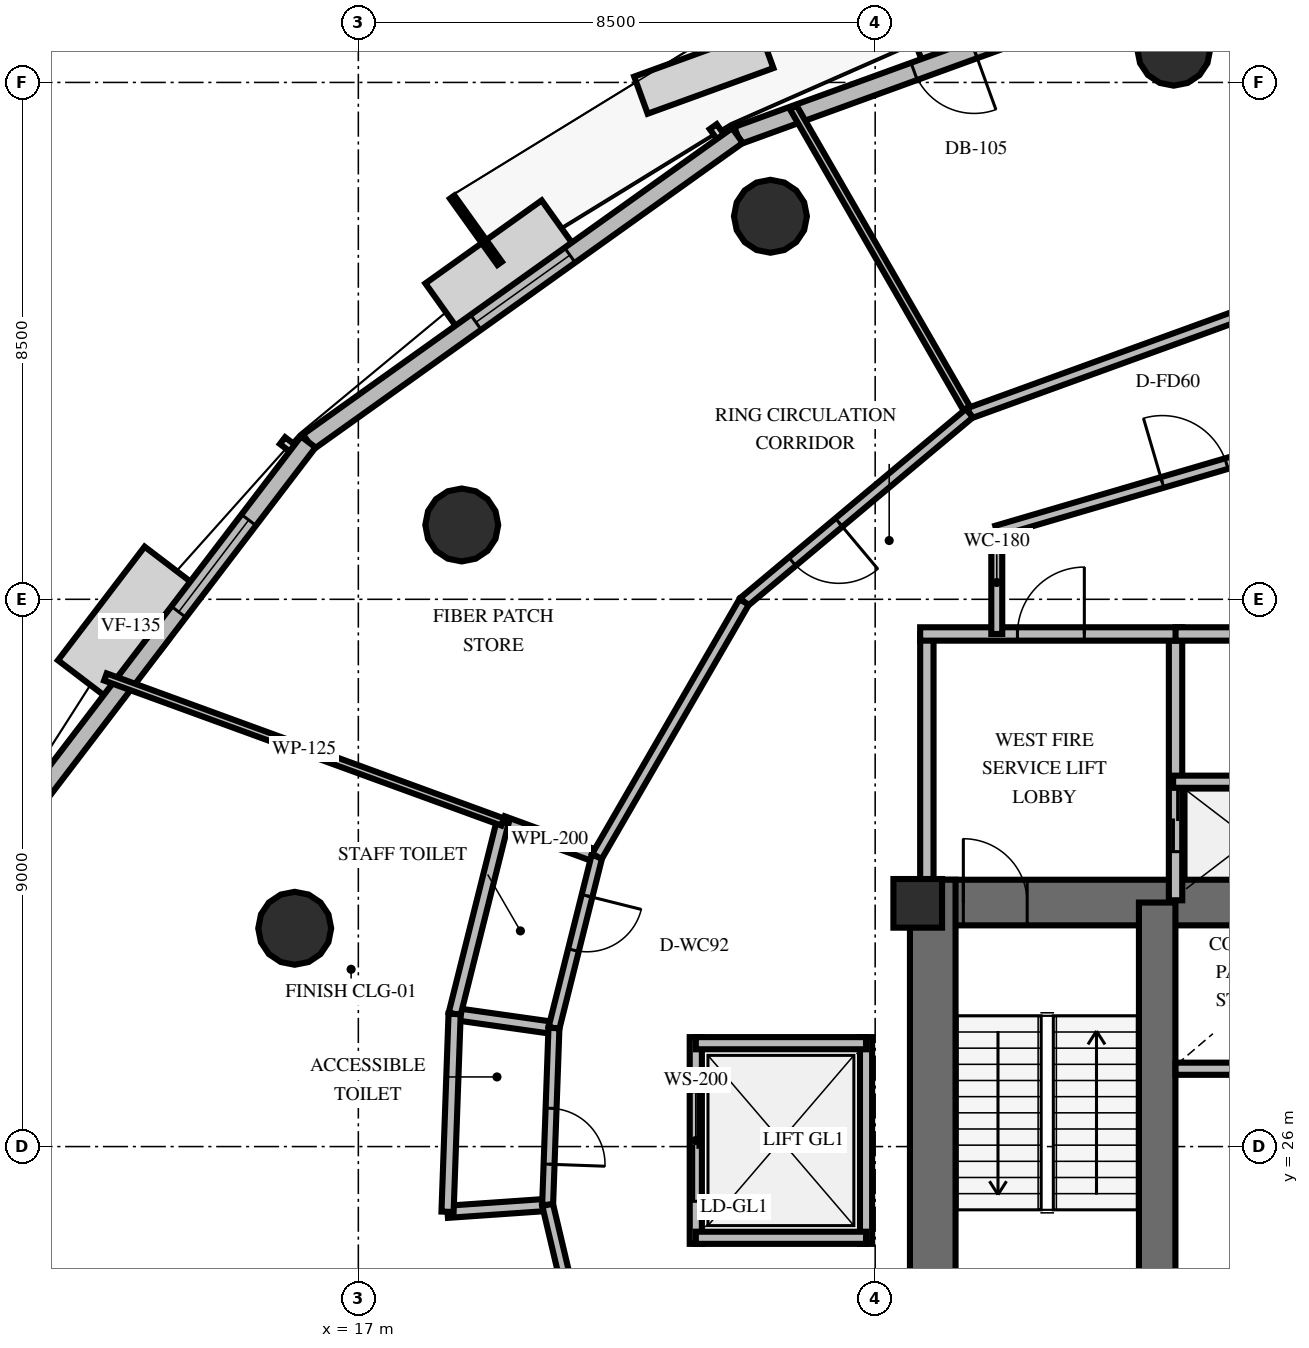
"""IFC4 building model, lengths in metres.
Left out: names, types, materials, properties, quantities, classifications, styles, units other than length and angle.
Written with IfcOpenShell. Run it as: python <this file> out.ifc"""

import sys

from ifc_helpers import new_model, si_unit, direction, frame, frame_2d, origin, origin_2d, place, context, subcontext, project, spatial, rectangle, circle, extrude, element, fill, save


model = new_model("IFC4")
c1 = context("Model", 3, precision=1e-05, world=origin(), true_north=direction((0.0, 1.0)))
c2 = subcontext(c1, "Body", "Model", "MODEL_VIEW")
j1 = project(units=[si_unit("LENGTHUNIT", "METRE"), si_unit("PLANEANGLEUNIT", "RADIAN")], contexts=[c1])
p1 = place(None, origin())
s1 = spatial("IfcSite", under=j1, at=p1, CompositionType="ELEMENT")
p2 = place(p1, origin())
s2 = spatial("IfcBuilding", under=s1, at=p2, CompositionType="ELEMENT")
p3 = place(p2, frame((0.0, 0.0, 117.8)))
s3 = spatial("IfcBuildingStorey", under=s2, at=p3, CompositionType="ELEMENT", Elevation=117.8)
p4 = place(p3, frame((26.072, 30.013, 0.0), z_axis=(0.0, 0.0, 1.0), x_axis=(1.0, 0.0, 0.0)))
e1 = element("IfcWall", 1, at=p4, inside=s3, PredefinedType="SHEAR", context=c2, shape_type="SweptSolid", body=[
    extrude(rectangle(XDim=15.866, YDim=0.75, at=frame_2d((7.933, 0.0))), origin(), (0.0, 0.0, 1.0), 4.0),
])
p5 = place(p4, frame((0.878, 0.0, 0.0)))
e2 = element("IfcOpeningElement", 2, at=p5, cuts=e1, PredefinedType="OPENING", context=c2, shape_type="SweptSolid", body=[
    extrude(rectangle(XDim=1.05, YDim=2.15, at=frame_2d((0.525, 1.075))), frame((0.0, 0.385, 0.0), z_axis=(0.0, -1.0, 0.0), x_axis=(1.0, 0.0, 0.0)), (0.0, 0.0, 1.0), 0.77),
])
p6 = place(p4, frame((13.928, 0.0, 0.0)))
e3 = element("IfcOpeningElement", 3, at=p6, cuts=e1, PredefinedType="OPENING", context=c2, shape_type="SweptSolid", body=[
    extrude(rectangle(XDim=1.05, YDim=2.15, at=frame_2d((0.525, 1.075))), frame((0.0, 0.385, 0.0), z_axis=(0.0, -1.0, 0.0), x_axis=(1.0, 0.0, 0.0)), (0.0, 0.0, 1.0), 0.77),
])
p7 = place(p4, frame((7.378, 0.0, 0.0)))
e4 = element("IfcOpeningElement", 4, at=p7, cuts=e1, PredefinedType="OPENING", context=c2, shape_type="SweptSolid", body=[
    extrude(rectangle(XDim=1.1, YDim=2.15, at=frame_2d((0.55, 1.075))), frame((0.0, 0.385, 0.0), z_axis=(0.0, -1.0, 0.0), x_axis=(1.0, 0.0, 0.0)), (0.0, 0.0, 1.0), 0.77),
])
p8 = place(p3, frame((26.447, 19.812, 0.0), z_axis=(0.0, 0.0, 1.0), x_axis=(0.0, 1.0, 0.0)))
e5 = element("IfcWall", 5, at=p8, inside=s3, PredefinedType="SHEAR", context=c2, shape_type="SweptSolid", body=[
    extrude(rectangle(XDim=10.576, YDim=0.75, at=frame_2d((5.288, 0.0))), origin(), (0.0, 0.0, 1.0), 4.0),
])
p9 = place(p3, frame((30.138, 20.187, 0.0), z_axis=(0.0, 0.0, 1.0), x_axis=(0.0, 1.0, 0.0)))
e6 = element("IfcWall", 6, at=p9, inside=s3, PredefinedType="SHEAR", context=c2, shape_type="SweptSolid", body=[
    extrude(rectangle(XDim=9.826, YDim=0.6, at=frame_2d((4.913, 0.0))), origin(), (0.0, 0.0, 1.0), 4.0),
])
p10 = place(p3, frame((26.2, 30.0, 0.0), z_axis=(0.0, 0.0, 1.0), x_axis=(1.0, 0.0, 0.0)))
e7 = element("IfcColumn", 7, at=p10, inside=s3, PredefinedType="PILASTER", context=c2, shape_type="SweptSolid", body=[
    extrude(rectangle(XDim=0.8, YDim=0.8, at=origin_2d()), origin(), (0.0, 0.0, 1.0), 4.0),
])
for number, where, z_axis, x_axis in (
    (8, (30.41, 44.046, 0.0), (0.0, 0.0, 1.0), (1.0, 0.0, 0.0)),
    (9, (23.778, 41.299, 0.0), (0.0, 0.0, 1.0), (1.0, 0.0, 0.0)),
    (10, (18.701, 36.222, 0.0), (0.0, 0.0, 1.0), (1.0, 0.0, 0.0)),
    (11, (15.954, 29.59, 0.0), (0.0, 0.0, 1.0), (1.0, 0.0, 0.0)),
):
    element("IfcColumn", number, at=place(p3, frame(where, z_axis=z_axis, x_axis=x_axis)), inside=s3, PredefinedType="COLUMN", context=c2, shape_type="SweptSolid", body=[
        extrude(circle(Radius=0.6, at=origin_2d()), origin(), (0.0, 0.0, 1.0), 4.0),
    ])
p11 = place(p3, frame((31.593, 45.661, 0.0), z_axis=(0.0, 0.0, 1.0), x_axis=(-0.939992901383, -0.341193999582, 0.0)))
e12 = element("IfcWall", 12, at=p11, inside=s3, PredefinedType="SOLIDWALL", context=c2, shape_type="SweptSolid", body=[
    extrude(rectangle(XDim=8.891, YDim=0.3, at=frame_2d((4.445, 0.0))), origin(), (0.0, 0.0, 1.0), 2.9),
])
p12 = place(p11, frame((4.75, 0.0, 0.0)))
e13 = element("IfcOpeningElement", 13, at=p12, cuts=e12, PredefinedType="OPENING", context=c2, shape_type="SweptSolid", body=[
    extrude(rectangle(XDim=1.05, YDim=2.15, at=frame_2d((0.525, 1.075))), frame((0.0, 0.16, 0.0), z_axis=(0.0, -1.0, 0.0), x_axis=(1.0, 0.0, 0.0)), (0.0, 0.0, 1.0), 0.32),
])
p13 = place(p3, frame((23.236, 42.627, 0.0), z_axis=(0.0, 0.0, 1.0), x_axis=(-0.8139046132, -0.580998520317, 0.0)))
e14 = element("IfcWall", 14, at=p13, inside=s3, PredefinedType="SOLIDWALL", context=c2, shape_type="SweptSolid", body=[
    extrude(rectangle(XDim=8.673, YDim=0.3, at=frame_2d((4.336, 0.0))), origin(), (0.0, 0.0, 1.0), 2.9),
])
p14 = place(p13, frame((3.386, 0.0, 0.8)))
e15 = element("IfcOpeningElement", 15, at=p14, cuts=e14, PredefinedType="OPENING", context=c2, shape_type="SweptSolid", body=[
    extrude(rectangle(XDim=1.9, YDim=1.95, at=frame_2d((0.95, 0.975))), frame((0.0, 0.16, 0.0), z_axis=(0.0, -1.0, 0.0), x_axis=(1.0, 0.0, 0.0)), (0.0, 0.0, 1.0), 0.32),
])
p15 = place(p3, frame((16.177, 37.588, 0.0), z_axis=(0.0, 0.0, 1.0), x_axis=(-0.606432047851, -0.795135316371, 0.0)))
e16 = element("IfcWall", 16, at=p15, inside=s3, PredefinedType="SOLIDWALL", context=c2, shape_type="SweptSolid", body=[
    extrude(rectangle(XDim=8.095, YDim=0.3, at=frame_2d((4.048, 0.0))), origin(), (0.0, 0.0, 1.0), 2.9),
])
p16 = place(p15, frame((1.615, 0.0, 0.8)))
e17 = element("IfcOpeningElement", 17, at=p16, cuts=e16, PredefinedType="OPENING", context=c2, shape_type="SweptSolid", body=[
    extrude(rectangle(XDim=1.9, YDim=1.95, at=frame_2d((0.95, 0.975))), frame((0.0, 0.16, 0.0), z_axis=(0.0, -1.0, 0.0), x_axis=(1.0, 0.0, 0.0)), (0.0, 0.0, 1.0), 0.32),
])
p17 = place(p3, frame((26.35, 30.05, 0.0), z_axis=(0.0, 0.0, 1.0), x_axis=(0.0, 1.0, 0.0)))
e18 = element("IfcWall", 18, at=p17, inside=s3, PredefinedType="SOLIDWALL", context=c2, shape_type="SweptSolid", body=[
    extrude(rectangle(XDim=4.38, YDim=0.22, at=frame_2d((2.19, 0.0))), origin(), (0.0, 0.0, 1.0), 2.8),
])
p18 = place(p3, frame((30.44, 30.05, 0.0), z_axis=(0.0, 0.0, 1.0), x_axis=(0.0, 1.0, 0.0)))
e19 = element("IfcWall", 19, at=p18, inside=s3, PredefinedType="SOLIDWALL", context=c2, shape_type="SweptSolid", body=[
    extrude(rectangle(XDim=4.38, YDim=0.22, at=frame_2d((2.19, 0.0))), origin(), (0.0, 0.0, 1.0), 2.8),
])
p19 = place(p18, frame((0.8, 0.0, 0.0)))
e20 = element("IfcOpeningElement", 20, at=p19, cuts=e19, PredefinedType="OPENING", context=c2, shape_type="SweptSolid", body=[
    extrude(rectangle(XDim=1.05, YDim=2.1, at=frame_2d((0.525, 1.05))), frame((0.0, 0.12, 0.0), z_axis=(0.0, -1.0, 0.0), x_axis=(1.0, 0.0, 0.0)), (0.0, 0.0, 1.0), 0.24),
])
p20 = place(p3, frame((26.24, 34.43, 0.0), z_axis=(0.0, 0.0, 1.0), x_axis=(1.0, 0.0, 0.0)))
e21 = element("IfcWall", 21, at=p20, inside=s3, PredefinedType="SOLIDWALL", context=c2, shape_type="SweptSolid", body=[
    extrude(rectangle(XDim=4.31, YDim=0.22, at=frame_2d((2.155, 0.0))), origin(), (0.0, 0.0, 1.0), 2.8),
])
p21 = place(p20, frame((1.6, 0.0, 0.0)))
e22 = element("IfcOpeningElement", 22, at=p21, cuts=e21, PredefinedType="OPENING", context=c2, shape_type="SweptSolid", body=[
    extrude(rectangle(XDim=1.1, YDim=2.15, at=frame_2d((0.55, 1.075))), frame((0.0, 0.12, 0.0), z_axis=(0.0, -1.0, 0.0), x_axis=(1.0, 0.0, 0.0)), (0.0, 0.0, 1.0), 0.24),
])
p22 = place(p3, frame((30.4, 32.0, 0.0), z_axis=(0.0, 0.0, 1.0), x_axis=(1.0, 0.0, 0.0)))
e23 = element("IfcWall", 23, at=p22, inside=s3, PredefinedType="SOLIDWALL", context=c2, shape_type="SweptSolid", body=[
    extrude(rectangle(XDim=2.55, YDim=0.2, at=frame_2d((1.275, 0.0))), origin(), (0.0, 0.0, 1.0), 2.8),
])
p23 = place(p3, frame((30.44, 34.43, 0.0), z_axis=(0.0, 0.0, 1.0), x_axis=(1.0, 0.0, 0.0)))
e24 = element("IfcWall", 24, at=p23, inside=s3, PredefinedType="SOLIDWALL", context=c2, shape_type="SweptSolid", body=[
    extrude(rectangle(XDim=7.12, YDim=0.22, at=frame_2d((3.56, 0.0))), origin(), (0.0, 0.0, 1.0), 2.8),
])
p24 = place(p23, frame((3.01, 0.0, 0.0)))
e25 = element("IfcOpeningElement", 25, at=p24, cuts=e24, PredefinedType="OPENING", context=c2, shape_type="SweptSolid", body=[
    extrude(rectangle(XDim=1.1, YDim=2.15, at=frame_2d((0.55, 1.075))), frame((0.0, 0.12, 0.0), z_axis=(0.0, -1.0, 0.0), x_axis=(1.0, 0.0, 0.0)), (0.0, 0.0, 1.0), 0.24),
])
p25 = place(p3, frame((30.44, 27.28, 0.0), z_axis=(0.0, 0.0, 1.0), x_axis=(1.0, 0.0, 0.0)))
e26 = element("IfcWall", 26, at=p25, inside=s3, PredefinedType="SOLIDWALL", context=c2, shape_type="SweptSolid", body=[
    extrude(rectangle(XDim=2.81, YDim=0.2, at=frame_2d((1.405, 0.0))), origin(), (0.0, 0.0, 1.0), 2.8),
])
p26 = place(p3, frame((22.55, 24.4, 0.0), z_axis=(0.0, 0.0, 1.0), x_axis=(0.0, 1.0, 0.0)))
e27 = element("IfcWall", 27, at=p26, inside=s3, PredefinedType="SOLIDWALL", context=c2, shape_type="SweptSolid", body=[
    extrude(rectangle(XDim=3.4, YDim=0.2, at=frame_2d((1.7, 0.0))), origin(), (0.0, 0.0, 1.0), 2.8),
])
p27 = place(p26, frame((0.7, 0.0, 0.0)))
e28 = element("IfcOpeningElement", 28, at=p27, cuts=e27, PredefinedType="OPENING", context=c2, shape_type="SweptSolid", body=[
    extrude(rectangle(XDim=1.8, YDim=2.4, at=frame_2d((0.9, 1.2))), frame((0.0, 0.11, 0.0), z_axis=(0.0, -1.0, 0.0), x_axis=(1.0, 0.0, 0.0)), (0.0, 0.0, 1.0), 0.22),
])
p28 = place(p3, frame((25.35, 24.4, 0.0), z_axis=(0.0, 0.0, 1.0), x_axis=(0.0, 1.0, 0.0)))
e29 = element("IfcWall", 29, at=p28, inside=s3, PredefinedType="SOLIDWALL", context=c2, shape_type="SweptSolid", body=[
    extrude(rectangle(XDim=3.4, YDim=0.2, at=frame_2d((1.7, 0.0))), origin(), (0.0, 0.0, 1.0), 2.8),
])
for number, where, z_axis, x_axis in (
    (30, (22.55, 24.5, 0.0), (0.0, 0.0, 1.0), (1.0, 0.0, 0.0)),
    (31, (22.55, 27.7, 0.0), (0.0, 0.0, 1.0), (1.0, 0.0, 0.0)),
):
    element("IfcWall", number, at=place(p3, frame(where, z_axis=z_axis, x_axis=x_axis)), inside=s3, PredefinedType="SOLIDWALL", context=c2, shape_type="SweptSolid", body=[
        extrude(rectangle(XDim=2.8, YDim=0.2, at=frame_2d((1.4, 0.0))), origin(), (0.0, 0.0, 1.0), 2.8),
    ])
p29 = place(p3, frame((27.5, 34.43, 0.0), z_axis=(0.0, 0.0, 1.0), x_axis=(0.0, 1.0, 0.0)))
e32 = element("IfcWall", 32, at=p29, inside=s3, PredefinedType="PARTITIONING", context=c2, shape_type="SweptSolid", body=[
    extrude(rectangle(XDim=1.693, YDim=0.18, at=frame_2d((0.846, 0.0))), origin(), (0.0, 0.0, 1.0), 2.8),
])
p30 = place(p3, frame((27.5, 36.123, 0.0), z_axis=(0.0, 0.0, 1.0), x_axis=(0.959546654541, 0.281549671923, 0.0)))
e33 = element("IfcWall", 33, at=p30, inside=s3, PredefinedType="PARTITIONING", context=c2, shape_type="SweptSolid", body=[
    extrude(rectangle(XDim=6.774, YDim=0.18, at=frame_2d((3.387, 0.0))), origin(), (0.0, 0.0, 1.0), 2.8),
])
p31 = place(p30, frame((2.837, 0.0, 0.0)))
e34 = element("IfcOpeningElement", 34, at=p31, cuts=e33, PredefinedType="OPENING", context=c2, shape_type="SweptSolid", body=[
    extrude(rectangle(XDim=1.1, YDim=2.15, at=frame_2d((0.55, 1.075))), frame((0.0, 0.1, 0.0), z_axis=(0.0, -1.0, 0.0), x_axis=(1.0, 0.0, 0.0)), (0.0, 0.0, 1.0), 0.2),
])
for number, where, z_axis, x_axis in (
    (35, (20.924, 30.772, 0.0), (0.0, 0.0, 1.0), (-0.939, 0.343, 0.0)),
    (36, (20.217, 27.949, 0.0), (0.0, 0.0, 1.0), (-0.99, 0.14, 0.0)),
):
    element("IfcWall", number, at=place(p3, frame(where, z_axis=z_axis, x_axis=x_axis)), inside=s3, PredefinedType="PLUMBINGWALL", context=c2, shape_type="SweptSolid", body=[
        extrude(rectangle(XDim=1.65, YDim=0.2, at=frame_2d((0.825, 0.0))), origin(), (0.0, 0.0, 1.0), 2.8),
    ])
p32 = place(p3, frame((19.374, 31.338, 0.0), z_axis=(0.0, 0.0, 1.0), x_axis=(-0.242729761631, -0.970093945357, 0.0)))
e37 = element("IfcWall", 37, at=p32, inside=s3, PredefinedType="PLUMBINGWALL", context=c2, shape_type="SweptSolid", body=[
    extrude(rectangle(XDim=3.255, YDim=0.2, at=frame_2d((1.627, 0.0))), origin(), (0.0, 0.0, 1.0), 2.8),
])
p33 = place(p3, frame((20.924, 30.772, 0.0), z_axis=(0.0, 0.0, 1.0), x_axis=(-0.242713284666, -0.970098067953, 0.0)))
e38 = element("IfcWall", 38, at=p33, inside=s3, PredefinedType="PARTITIONING", context=c2, shape_type="SweptSolid", body=[
    extrude(rectangle(XDim=2.91, YDim=0.18, at=frame_2d((1.455, 0.0))), origin(), (0.0, 0.0, 1.0), 2.8),
])
p34 = place(p33, frame((0.669, 0.0, 0.0)))
e39 = element("IfcOpeningElement", 39, at=p34, cuts=e38, PredefinedType="OPENING", context=c2, shape_type="SweptSolid", body=[
    extrude(rectangle(XDim=0.92, YDim=2.1, at=frame_2d((0.46, 1.05))), frame((0.0, 0.1, 0.0), z_axis=(0.0, -1.0, 0.0), x_axis=(1.0, 0.0, 0.0)), (0.0, 0.0, 1.0), 0.2),
])
p35 = place(p3, frame((20.113, 25.041, 0.0), z_axis=(0.0, 0.0, 1.0), x_axis=(-0.99762997818, -0.068807169958, 0.0)))
e40 = element("IfcWall", 40, at=p35, inside=s3, PredefinedType="PLUMBINGWALL", context=c2, shape_type="SweptSolid", body=[
    extrude(rectangle(XDim=1.65, YDim=0.2, at=frame_2d((0.825, 0.0))), origin(), (0.0, 0.0, 1.0), 2.8),
])
p36 = place(p3, frame((18.583, 28.18, 0.0), z_axis=(0.0, 0.0, 1.0), x_axis=(-0.035777140599, -0.999359793173, 0.0)))
e41 = element("IfcWall", 41, at=p36, inside=s3, PredefinedType="PLUMBINGWALL", context=c2, shape_type="SweptSolid", body=[
    extrude(rectangle(XDim=3.255, YDim=0.2, at=frame_2d((1.627, 0.0))), origin(), (0.0, 0.0, 1.0), 2.8),
])
p37 = place(p3, frame((20.217, 27.949, 0.0), z_axis=(0.0, 0.0, 1.0), x_axis=(-0.035823197379, -0.999358143275, 0.0)))
e42 = element("IfcWall", 42, at=p37, inside=s3, PredefinedType="PARTITIONING", context=c2, shape_type="SweptSolid", body=[
    extrude(rectangle(XDim=2.91, YDim=0.18, at=frame_2d((1.455, 0.0))), origin(), (0.0, 0.0, 1.0), 2.8),
])
p38 = place(p37, frame((1.321, 0.0, 0.0)))
e43 = element("IfcOpeningElement", 43, at=p38, cuts=e42, PredefinedType="OPENING", context=c2, shape_type="SweptSolid", body=[
    extrude(rectangle(XDim=0.92, YDim=2.1, at=frame_2d((0.46, 1.05))), frame((0.0, 0.1, 0.0), z_axis=(0.0, -1.0, 0.0), x_axis=(1.0, 0.0, 0.0)), (0.0, 0.0, 1.0), 0.2),
])
p39 = place(p3, frame((19.374, 31.338, 0.0), z_axis=(0.0, 0.0, 1.0), x_axis=(-0.939385857188, 0.342861796232, 0.0)))
e44 = element("IfcWall", 44, at=p39, inside=s3, PredefinedType="PARTITIONING", context=c2, shape_type="SweptSolid", body=[
    extrude(rectangle(XDim=6.955, YDim=0.125, at=frame_2d((3.478, 0.0))), origin(), (0.0, 0.0, 1.0), 2.8),
])
p40 = place(p3, frame((20.113, 25.041, 0.0), z_axis=(0.0, 0.0, 1.0), x_axis=(0.229765650993, -0.973245984129, 0.0)))
e45 = element("IfcWall", 45, at=p40, inside=s3, PredefinedType="PARTITIONING", context=c2, shape_type="SweptSolid", body=[
    extrude(rectangle(XDim=4.515, YDim=0.18, at=frame_2d((2.257, 0.0))), origin(), (0.0, 0.0, 1.0), 2.8),
])
p41 = place(p3, frame((27.051, 38.061, 0.0), z_axis=(0.0, 0.0, 1.0), x_axis=(-0.499221008812, 0.866474687663, 0.0)))
e46 = element("IfcWall", 46, at=p41, inside=s3, PredefinedType="PARTITIONING", context=c2, shape_type="SweptSolid", body=[
    extrude(rectangle(XDim=5.803, YDim=0.125, at=frame_2d((2.902, 0.0))), origin(), (0.0, 0.0, 1.0), 2.8),
])
p42 = place(p3, frame((31.595, 39.711, 0.0), z_axis=(0.0, 0.0, 1.0), x_axis=(-0.939977597515, -0.341236158943, 0.0)))
e47 = element("IfcWall", 47, at=p42, inside=s3, PredefinedType="PARTITIONING", context=c2, shape_type="SweptSolid", body=[
    extrude(rectangle(XDim=4.834, YDim=0.18, at=frame_2d((2.417, 0.0))), origin(), (0.0, 0.0, 1.0), 2.8),
])
p43 = place(p3, frame((27.051, 38.061, 0.0), z_axis=(0.0, 0.0, 1.0), x_axis=(-0.766604462261, -0.642119613811, 0.0)))
e48 = element("IfcWall", 48, at=p43, inside=s3, PredefinedType="PARTITIONING", context=c2, shape_type="SweptSolid", body=[
    extrude(rectangle(XDim=4.834, YDim=0.18, at=frame_2d((2.417, 0.0))), origin(), (0.0, 0.0, 1.0), 2.8),
])
p44 = place(p43, frame((2.801, 0.0, 0.0)))
e49 = element("IfcOpeningElement", 49, at=p44, cuts=e48, PredefinedType="OPENING", context=c2, shape_type="SweptSolid", body=[
    extrude(rectangle(XDim=1.0, YDim=2.15, at=frame_2d((0.5, 1.075))), frame((0.0, 0.1, 0.0), z_axis=(0.0, -1.0, 0.0), x_axis=(1.0, 0.0, 0.0)), (0.0, 0.0, 1.0), 0.2),
])
p45 = place(p3, frame((23.344, 34.957, 0.0), z_axis=(0.0, 0.0, 1.0), x_axis=(-0.500765511673, -0.865582984074, 0.0)))
e50 = element("IfcWall", 50, at=p45, inside=s3, PredefinedType="PARTITIONING", context=c2, shape_type="SweptSolid", body=[
    extrude(rectangle(XDim=4.834, YDim=0.18, at=frame_2d((2.417, 0.0))), origin(), (0.0, 0.0, 1.0), 2.8),
])
p46 = place(p12, origin())
e51 = element("IfcDoor", 51, at=p46, inside=s3, OperationType="SINGLE_SWING_LEFT", PredefinedType="DOOR", context=c2, shape_type="SweptSolid", body=[
    extrude(rectangle(XDim=1.05, YDim=2.15, at=frame_2d((0.525, 1.075))), frame((0.0, 0.025, 0.0), z_axis=(0.0, -1.0, 0.0), x_axis=(1.0, 0.0, 0.0)), (0.0, 0.0, 1.0), 0.05),
])
fill(e13, e51)
p47 = place(p14, origin())
e52 = element("IfcWindow", 52, at=p47, inside=s3, PartitioningType="SINGLE_PANEL", PredefinedType="WINDOW", context=c2, shape_type="SweptSolid", body=[
    extrude(rectangle(XDim=1.9, YDim=1.95, at=frame_2d((0.95, 0.975))), frame((0.0, 0.03, 0.0), z_axis=(0.0, -1.0, 0.0), x_axis=(1.0, 0.0, 0.0)), (0.0, 0.0, 1.0), 0.06),
])
fill(e15, e52)
p48 = place(p16, origin())
e53 = element("IfcWindow", 53, at=p48, inside=s3, PartitioningType="SINGLE_PANEL", PredefinedType="WINDOW", context=c2, shape_type="SweptSolid", body=[
    extrude(rectangle(XDim=1.9, YDim=1.95, at=frame_2d((0.95, 0.975))), frame((0.0, 0.03, 0.0), z_axis=(0.0, -1.0, 0.0), x_axis=(1.0, 0.0, 0.0)), (0.0, 0.0, 1.0), 0.06),
])
fill(e17, e53)
p49 = place(p5, origin())
e54 = element("IfcDoor", 54, at=p49, inside=s3, OperationType="SINGLE_SWING_LEFT", PredefinedType="DOOR", context=c2, shape_type="SweptSolid", body=[
    extrude(rectangle(XDim=1.05, YDim=2.15, at=frame_2d((0.525, 1.075))), frame((0.0, 0.025, 0.0), z_axis=(0.0, -1.0, 0.0), x_axis=(1.0, 0.0, 0.0)), (0.0, 0.0, 1.0), 0.05),
])
fill(e2, e54)
p50 = place(p21, origin())
e55 = element("IfcDoor", 55, at=p50, inside=s3, OperationType="SINGLE_SWING_RIGHT", PredefinedType="DOOR", context=c2, shape_type="SweptSolid", body=[
    extrude(rectangle(XDim=1.1, YDim=2.15, at=frame_2d((0.55, 1.075))), frame((0.0, 0.025, 0.0), z_axis=(0.0, -1.0, 0.0), x_axis=(1.0, 0.0, 0.0)), (0.0, 0.0, 1.0), 0.05),
])
fill(e22, e55)
p51 = place(p19, origin())
e56 = element("IfcDoor", 56, at=p51, inside=s3, OperationType="DOUBLE_DOOR_SLIDING", PredefinedType="USERDEFINED", context=c2, shape_type="SweptSolid", body=[
    extrude(rectangle(XDim=1.05, YDim=2.1, at=frame_2d((0.525, 1.05))), frame((0.0, 0.025, 0.0), z_axis=(0.0, -1.0, 0.0), x_axis=(1.0, 0.0, 0.0)), (0.0, 0.0, 1.0), 0.05),
])
fill(e20, e56)
p52 = place(p27, origin())
e57 = element("IfcDoor", 57, at=p52, inside=s3, OperationType="DOUBLE_DOOR_SLIDING", PredefinedType="USERDEFINED", context=c2, shape_type="SweptSolid", body=[
    extrude(rectangle(XDim=1.8, YDim=2.4, at=frame_2d((0.9, 1.2))), frame((0.0, 0.025, 0.0), z_axis=(0.0, -1.0, 0.0), x_axis=(1.0, 0.0, 0.0)), (0.0, 0.0, 1.0), 0.05),
])
fill(e28, e57)
p53 = place(p31, origin())
e58 = element("IfcDoor", 58, at=p53, inside=s3, OperationType="SINGLE_SWING_LEFT", PredefinedType="DOOR", context=c2, shape_type="SweptSolid", body=[
    extrude(rectangle(XDim=1.1, YDim=2.15, at=frame_2d((0.55, 1.075))), frame((0.0, 0.025, 0.0), z_axis=(0.0, -1.0, 0.0), x_axis=(1.0, 0.0, 0.0)), (0.0, 0.0, 1.0), 0.05),
])
fill(e34, e58)
p54 = place(p34, origin())
e59 = element("IfcDoor", 59, at=p54, inside=s3, OperationType="SINGLE_SWING_LEFT", PredefinedType="DOOR", context=c2, shape_type="SweptSolid", body=[
    extrude(rectangle(XDim=0.92, YDim=2.1, at=frame_2d((0.46, 1.05))), frame((0.0, 0.025, 0.0), z_axis=(0.0, -1.0, 0.0), x_axis=(1.0, 0.0, 0.0)), (0.0, 0.0, 1.0), 0.05),
])
fill(e39, e59)
p55 = place(p38, origin())
e60 = element("IfcDoor", 60, at=p55, inside=s3, OperationType="SINGLE_SWING_RIGHT", PredefinedType="DOOR", context=c2, shape_type="SweptSolid", body=[
    extrude(rectangle(XDim=0.92, YDim=2.1, at=frame_2d((0.46, 1.05))), frame((0.0, 0.025, 0.0), z_axis=(0.0, -1.0, 0.0), x_axis=(1.0, 0.0, 0.0)), (0.0, 0.0, 1.0), 0.05),
])
fill(e43, e60)
p56 = place(p44, origin())
e61 = element("IfcDoor", 61, at=p56, inside=s3, OperationType="SINGLE_SWING_LEFT", PredefinedType="DOOR", context=c2, shape_type="SweptSolid", body=[
    extrude(rectangle(XDim=1.0, YDim=2.15, at=frame_2d((0.5, 1.075))), frame((0.0, 0.025, 0.0), z_axis=(0.0, -1.0, 0.0), x_axis=(1.0, 0.0, 0.0)), (0.0, 0.0, 1.0), 0.05),
])
fill(e49, e61)
save(model, sys.argv[1])
